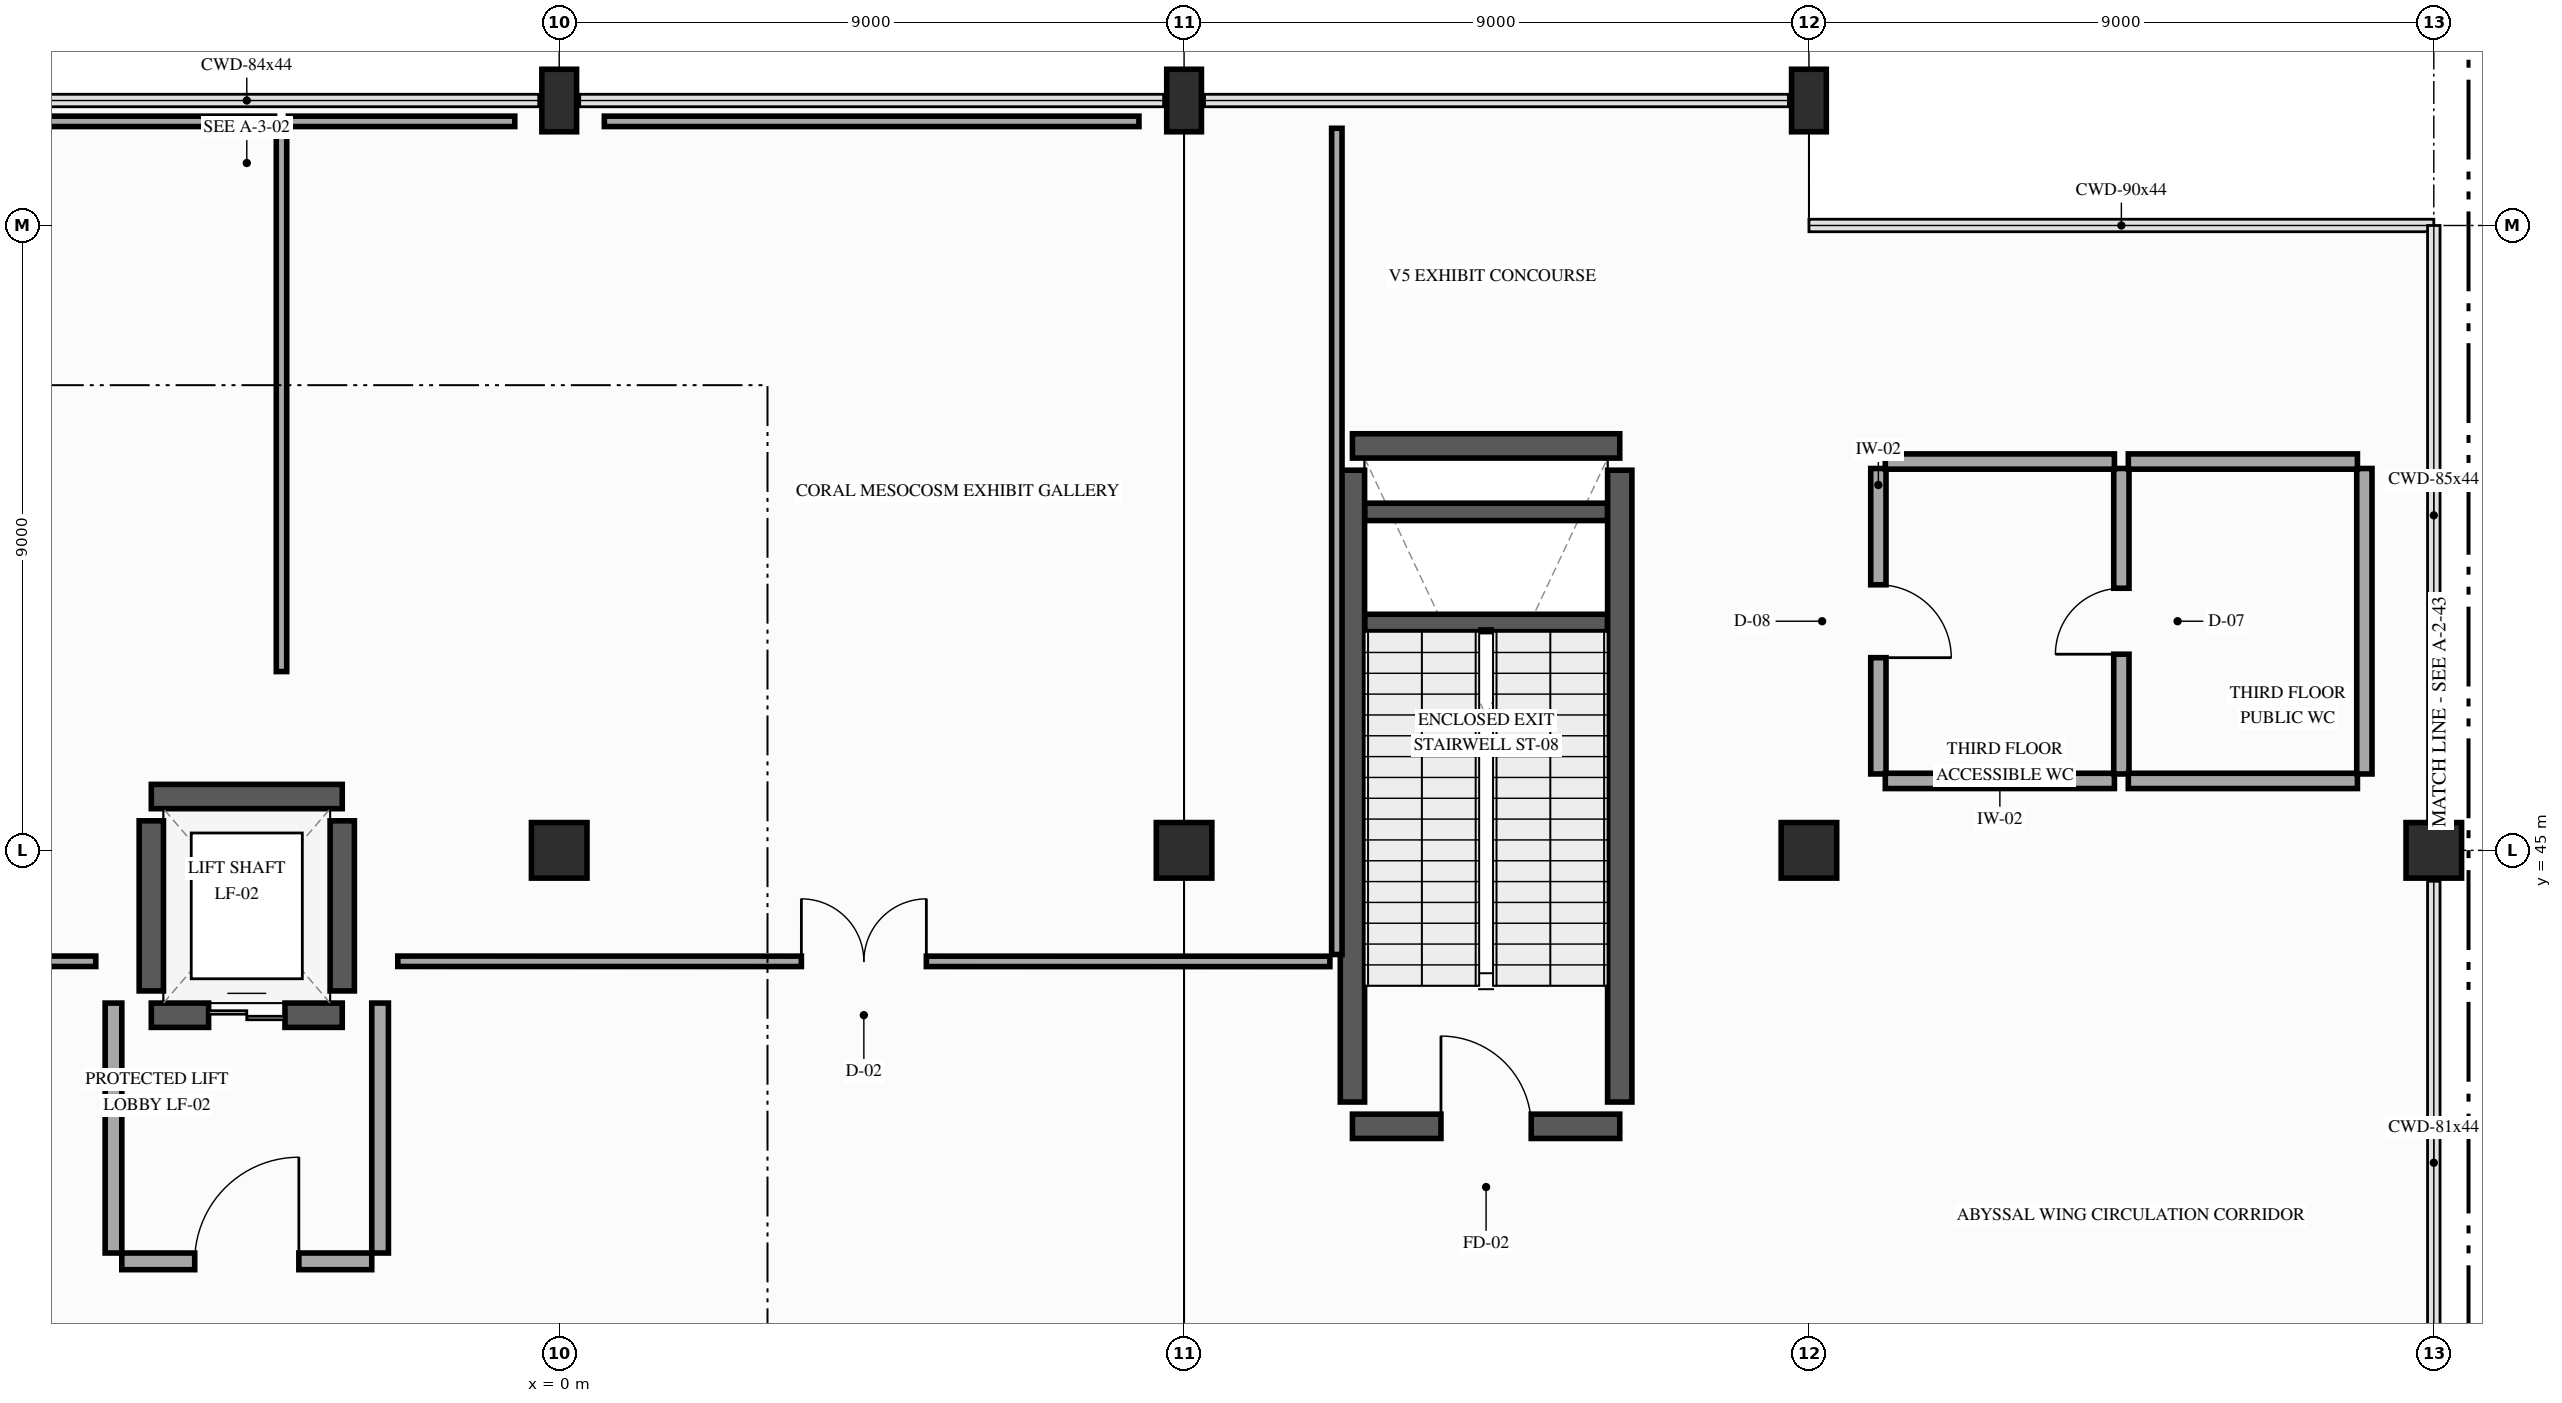
"""IFC4 building model, lengths in metres.
Left out: names, types, materials, properties, quantities, classifications, styles, units other than length and angle.
Written with IfcOpenShell. Run it as: python <this file> out.ifc"""

import sys

from ifc_helpers import new_model, si_unit, direction, frame, frame_2d, origin, origin_2d, place, context, subcontext, project, spatial, rectangle, extrude, element, fill, save


model = new_model("IFC4")
c1 = context("Model", 3, precision=1e-05, world=origin(), true_north=direction((0.0, 1.0)))
c2 = subcontext(c1, "Body", "Model", "MODEL_VIEW")
j1 = project(units=[si_unit("LENGTHUNIT", "METRE"), si_unit("PLANEANGLEUNIT", "RADIAN")], contexts=[c1])
p1 = place(None, origin())
s1 = spatial("IfcSite", under=j1, at=p1, CompositionType="ELEMENT")
p2 = place(p1, origin())
s2 = spatial("IfcBuilding", under=s1, at=p2, CompositionType="ELEMENT")
p3 = place(p2, frame((0.0, 0.0, 16.2)))
s3 = spatial("IfcBuildingStorey", under=s2, at=p3, CompositionType="ELEMENT", Elevation=16.2)
p4 = place(p3, frame((0.0, 45.0, 0.0), z_axis=(0.0, 0.0, 1.0), x_axis=(1.0, 0.0, 0.0)))
e1 = element("IfcColumn", 1, at=p4, inside=s3, PredefinedType="COLUMN", context=c2, shape_type="SweptSolid", body=[
    extrude(rectangle(XDim=0.8, YDim=0.8, at=origin_2d()), origin(), (0.0, 0.0, 1.0), 5.4),
])
p5 = place(p3, frame((0.0, 55.8, 0.0), z_axis=(0.0, 0.0, 1.0), x_axis=(1.0, 0.0, 0.0)))
e2 = element("IfcColumn", 2, at=p5, inside=s3, PredefinedType="PILASTER", context=c2, shape_type="SweptSolid", body=[
    extrude(rectangle(XDim=0.5, YDim=0.9, at=origin_2d()), origin(), (0.0, 0.0, 1.0), 5.4),
])
p6 = place(p3, frame((9.0, 45.0, 0.0), z_axis=(0.0, 0.0, 1.0), x_axis=(1.0, 0.0, 0.0)))
e3 = element("IfcColumn", 3, at=p6, inside=s3, PredefinedType="COLUMN", context=c2, shape_type="SweptSolid", body=[
    extrude(rectangle(XDim=0.8, YDim=0.8, at=origin_2d()), origin(), (0.0, 0.0, 1.0), 5.4),
])
p7 = place(p3, frame((9.0, 55.8, 0.0), z_axis=(0.0, 0.0, 1.0), x_axis=(1.0, 0.0, 0.0)))
e4 = element("IfcColumn", 4, at=p7, inside=s3, PredefinedType="PILASTER", context=c2, shape_type="SweptSolid", body=[
    extrude(rectangle(XDim=0.5, YDim=0.9, at=origin_2d()), origin(), (0.0, 0.0, 1.0), 5.4),
])
p8 = place(p3, frame((18.0, 45.0, 0.0), z_axis=(0.0, 0.0, 1.0), x_axis=(1.0, 0.0, 0.0)))
e5 = element("IfcColumn", 5, at=p8, inside=s3, PredefinedType="COLUMN", context=c2, shape_type="SweptSolid", body=[
    extrude(rectangle(XDim=0.8, YDim=0.8, at=origin_2d()), origin(), (0.0, 0.0, 1.0), 5.4),
])
p9 = place(p3, frame((18.0, 55.8, 0.0), z_axis=(0.0, 0.0, 1.0), x_axis=(1.0, 0.0, 0.0)))
e6 = element("IfcColumn", 6, at=p9, inside=s3, PredefinedType="PILASTER", context=c2, shape_type="SweptSolid", body=[
    extrude(rectangle(XDim=0.5, YDim=0.9, at=origin_2d()), origin(), (0.0, 0.0, 1.0), 5.4),
])
p10 = place(p3, frame((27.0, 45.0, 0.0), z_axis=(0.0, 0.0, 1.0), x_axis=(1.0, 0.0, 0.0)))
e7 = element("IfcColumn", 7, at=p10, inside=s3, PredefinedType="COLUMN", context=c2, shape_type="SweptSolid", body=[
    extrude(rectangle(XDim=0.8, YDim=0.8, at=origin_2d()), origin(), (0.0, 0.0, 1.0), 5.4),
])
for number, where, z_axis, x_axis in (
    (8, (11.6, 48.275, 0.0), (0.0, 0.0, 1.0), (1.0, 0.0, 0.0)),
    (9, (11.6, 49.875, 0.0), (0.0, 0.0, 1.0), (1.0, 0.0, 0.0)),
):
    element("IfcWall", number, at=place(p3, frame(where, z_axis=z_axis, x_axis=x_axis)), inside=s3, PredefinedType="SHEAR", context=c2, shape_type="SweptSolid", body=[
        extrude(rectangle(XDim=3.5, YDim=0.25, at=frame_2d((1.75, 0.0))), origin(), (0.0, 0.0, 1.0), 2.5),
    ])
p11 = place(p3, frame((11.425, 41.025, 0.0), z_axis=(0.0, 0.0, 1.0), x_axis=(1.0, 0.0, 0.0)))
e10 = element("IfcWall", 10, at=p11, inside=s3, PredefinedType="SHEAR", context=c2, shape_type="SweptSolid", body=[
    extrude(rectangle(XDim=3.85, YDim=0.35, at=frame_2d((1.925, 0.0))), origin(), (0.0, 0.0, 1.0), 5.15),
])
p12 = place(p11, frame((1.275, 0.0, 0.0)))
e11 = element("IfcOpeningElement", 11, at=p12, cuts=e10, PredefinedType="OPENING", context=c2, shape_type="SweptSolid", body=[
    extrude(rectangle(XDim=1.3, YDim=2.2, at=frame_2d((0.65, 1.1))), frame((0.0, 0.185, 0.0), z_axis=(0.0, -1.0, 0.0), x_axis=(1.0, 0.0, 0.0)), (0.0, 0.0, 1.0), 0.37),
])
p13 = place(p3, frame((11.425, 50.825, 0.0), z_axis=(0.0, 0.0, 1.0), x_axis=(1.0, 0.0, 0.0)))
e12 = element("IfcWall", 12, at=p13, inside=s3, PredefinedType="SHEAR", context=c2, shape_type="SweptSolid", body=[
    extrude(rectangle(XDim=3.85, YDim=0.35, at=frame_2d((1.925, 0.0))), origin(), (0.0, 0.0, 1.0), 5.15),
])
for number, where, z_axis, x_axis in (
    (13, (11.425, 41.375, 0.0), (0.0, 0.0, 1.0), (0.0, 1.0, 0.0)),
    (14, (15.275, 41.375, 0.0), (0.0, 0.0, 1.0), (0.0, 1.0, 0.0)),
):
    element("IfcWall", number, at=place(p3, frame(where, z_axis=z_axis, x_axis=x_axis)), inside=s3, PredefinedType="SHEAR", context=c2, shape_type="SweptSolid", body=[
        extrude(rectangle(XDim=9.1, YDim=0.35, at=frame_2d((4.55, 0.0))), origin(), (0.0, 0.0, 1.0), 5.15),
    ])
p14 = place(p3, frame((-5.875, 42.625, 0.0), z_axis=(0.0, 0.0, 1.0), x_axis=(1.0, 0.0, 0.0)))
e15 = element("IfcWall", 15, at=p14, inside=s3, PredefinedType="SHEAR", context=c2, shape_type="SweptSolid", body=[
    extrude(rectangle(XDim=2.75, YDim=0.35, at=frame_2d((1.375, 0.0))), origin(), (0.0, 0.0, 1.0), 5.15),
])
p15 = place(p14, frame((0.825, 0.0, 0.0)))
e16 = element("IfcOpeningElement", 16, at=p15, cuts=e15, PredefinedType="OPENING", context=c2, shape_type="SweptSolid", body=[
    extrude(rectangle(XDim=1.1, YDim=2.2, at=frame_2d((0.55, 1.1))), frame((0.0, 0.185, 0.0), z_axis=(0.0, -1.0, 0.0), x_axis=(1.0, 0.0, 0.0)), (0.0, 0.0, 1.0), 0.37),
])
p16 = place(p3, frame((-3.125, 45.775, 0.0), z_axis=(0.0, 0.0, 1.0), x_axis=(-1.0, 0.0, 0.0)))
e17 = element("IfcWall", 17, at=p16, inside=s3, PredefinedType="SHEAR", context=c2, shape_type="SweptSolid", body=[
    extrude(rectangle(XDim=2.75, YDim=0.35, at=frame_2d((1.375, 0.0))), origin(), (0.0, 0.0, 1.0), 5.15),
])
for number, where, z_axis, x_axis in (
    (18, (-5.875, 42.975, 0.0), (0.0, 0.0, 1.0), (0.0, 1.0, 0.0)),
    (19, (-3.125, 42.975, 0.0), (0.0, 0.0, 1.0), (0.0, 1.0, 0.0)),
):
    element("IfcWall", number, at=place(p3, frame(where, z_axis=z_axis, x_axis=x_axis)), inside=s3, PredefinedType="SHEAR", context=c2, shape_type="SweptSolid", body=[
        extrude(rectangle(XDim=2.45, YDim=0.35, at=frame_2d((1.225, 0.0))), origin(), (0.0, 0.0, 1.0), 5.15),
    ])
p17 = place(p3, frame((-6.3, 39.08, 0.0), z_axis=(0.0, 0.0, 1.0), x_axis=(1.0, 0.0, 0.0)))
e20 = element("IfcWall", 20, at=p17, inside=s3, PredefinedType="PARTITIONING", context=c2, shape_type="SweptSolid", body=[
    extrude(rectangle(XDim=3.6, YDim=0.24, at=frame_2d((1.8, 0.0))), origin(), (0.0, 0.0, 1.0), 4.635),
])
p18 = place(p17, frame((1.05, 0.0, 0.0)))
e21 = element("IfcOpeningElement", 21, at=p18, cuts=e20, PredefinedType="OPENING", context=c2, shape_type="SweptSolid", body=[
    extrude(rectangle(XDim=1.5, YDim=2.2, at=frame_2d((0.75, 1.1))), frame((0.0, 0.13, 0.0), z_axis=(0.0, -1.0, 0.0), x_axis=(1.0, 0.0, 0.0)), (0.0, 0.0, 1.0), 0.26),
])
for number, where, z_axis, x_axis in (
    (22, (-6.42, 39.2, 0.0), (0.0, 0.0, 1.0), (0.0, 1.0, 0.0)),
    (23, (-2.58, 39.2, 0.0), (0.0, 0.0, 1.0), (0.0, 1.0, 0.0)),
):
    element("IfcWall", number, at=place(p3, frame(where, z_axis=z_axis, x_axis=x_axis)), inside=s3, PredefinedType="PARTITIONING", context=c2, shape_type="SweptSolid", body=[
        extrude(rectangle(XDim=3.6, YDim=0.24, at=frame_2d((1.8, 0.0))), origin(), (0.0, 0.0, 1.0), 4.635),
    ])
p19 = place(p3, frame((19.0, 50.5, 0.0), z_axis=(0.0, 0.0, 1.0), x_axis=(0.0, -1.0, 0.0)))
e24 = element("IfcWall", 24, at=p19, inside=s3, PredefinedType="PLUMBINGWALL", context=c2, shape_type="SweptSolid", body=[
    extrude(rectangle(XDim=4.4, YDim=0.22, at=frame_2d((2.2, 0.0))), origin(), (0.0, 0.0, 1.0), 5.05),
])
p20 = place(p19, frame((1.675, 0.0, 0.0)))
e25 = element("IfcOpeningElement", 25, at=p20, cuts=e24, PredefinedType="OPENING", context=c2, shape_type="SweptSolid", body=[
    extrude(rectangle(XDim=1.05, YDim=2.15, at=frame_2d((0.525, 1.075))), frame((0.0, 0.12, 0.0), z_axis=(0.0, -1.0, 0.0), x_axis=(1.0, 0.0, 0.0)), (0.0, 0.0, 1.0), 0.24),
])
p21 = place(p3, frame((19.1, 46.0, 0.0), z_axis=(0.0, 0.0, 1.0), x_axis=(1.0, 0.0, 0.0)))
e26 = element("IfcWall", 26, at=p21, inside=s3, PredefinedType="PLUMBINGWALL", context=c2, shape_type="SweptSolid", body=[
    extrude(rectangle(XDim=3.3, YDim=0.22, at=frame_2d((1.65, 0.0))), origin(), (0.0, 0.0, 1.0), 5.05),
])
p22 = place(p3, frame((22.5, 46.1, 0.0), z_axis=(0.0, 0.0, 1.0), x_axis=(0.0, 1.0, 0.0)))
e27 = element("IfcWall", 27, at=p22, inside=s3, PredefinedType="PLUMBINGWALL", context=c2, shape_type="SweptSolid", body=[
    extrude(rectangle(XDim=4.4, YDim=0.22, at=frame_2d((2.2, 0.0))), origin(), (0.0, 0.0, 1.0), 5.05),
])
p23 = place(p22, frame((1.725, 0.0, 0.0)))
e28 = element("IfcOpeningElement", 28, at=p23, cuts=e27, PredefinedType="OPENING", context=c2, shape_type="SweptSolid", body=[
    extrude(rectangle(XDim=0.95, YDim=2.15, at=frame_2d((0.475, 1.075))), frame((0.0, 0.12, 0.0), z_axis=(0.0, -1.0, 0.0), x_axis=(1.0, 0.0, 0.0)), (0.0, 0.0, 1.0), 0.24),
])
for number, where, z_axis, x_axis in (
    (29, (22.4, 50.6, 0.0), (0.0, 0.0, 1.0), (-1.0, 0.0, 0.0)),
    (30, (22.6, 46.0, 0.0), (0.0, 0.0, 1.0), (1.0, 0.0, 0.0)),
):
    element("IfcWall", number, at=place(p3, frame(where, z_axis=z_axis, x_axis=x_axis)), inside=s3, PredefinedType="PLUMBINGWALL", context=c2, shape_type="SweptSolid", body=[
        extrude(rectangle(XDim=3.3, YDim=0.22, at=frame_2d((1.65, 0.0))), origin(), (0.0, 0.0, 1.0), 5.05),
    ])
p24 = place(p3, frame((26.0, 46.1, 0.0), z_axis=(0.0, 0.0, 1.0), x_axis=(0.0, 1.0, 0.0)))
e31 = element("IfcWall", 31, at=p24, inside=s3, PredefinedType="PLUMBINGWALL", context=c2, shape_type="SweptSolid", body=[
    extrude(rectangle(XDim=4.4, YDim=0.22, at=frame_2d((2.2, 0.0))), origin(), (0.0, 0.0, 1.0), 5.05),
])
p25 = place(p3, frame((25.9, 50.6, 0.0), z_axis=(0.0, 0.0, 1.0), x_axis=(-1.0, 0.0, 0.0)))
e32 = element("IfcWall", 32, at=p25, inside=s3, PredefinedType="PLUMBINGWALL", context=c2, shape_type="SweptSolid", body=[
    extrude(rectangle(XDim=3.3, YDim=0.22, at=frame_2d((1.65, 0.0))), origin(), (0.0, 0.0, 1.0), 5.05),
])
p26 = place(p3, frame((-20.1, 43.4, 0.0), z_axis=(0.0, 0.0, 1.0), x_axis=(0.999999986606, 0.000163669095, 0.0)))
e33 = element("IfcWall", 33, at=p26, inside=s3, PredefinedType="PARTITIONING", context=c2, shape_type="SweptSolid", body=[
    extrude(rectangle(XDim=13.425, YDim=0.15, at=frame_2d((6.712, 0.0))), origin(), (0.0, 0.0, 1.0), 4.435),
])
p27 = place(p26, frame((5.813, 0.0, 0.0)))
e34 = element("IfcOpeningElement", 34, at=p27, cuts=e33, PredefinedType="OPENING", context=c2, shape_type="SweptSolid", body=[
    extrude(rectangle(XDim=1.8, YDim=2.3, at=frame_2d((0.9, 1.15))), frame((0.0, 0.085, 0.0), z_axis=(0.0, -1.0, 0.0), x_axis=(1.0, 0.0, 0.0)), (0.0, 0.0, 1.0), 0.17),
])
p28 = place(p3, frame((-4.0, 47.575, 0.0), z_axis=(0.0, 0.0, 1.0), x_axis=(0.0, 1.0, 0.0)))
e35 = element("IfcWall", 35, at=p28, inside=s3, PredefinedType="PARTITIONING", context=c2, shape_type="SweptSolid", body=[
    extrude(rectangle(XDim=7.825, YDim=0.15, at=frame_2d((3.913, 0.0))), origin(), (0.0, 0.0, 1.0), 4.385),
])
p29 = place(p3, frame((-4.1, 55.5, 0.0), z_axis=(0.0, 0.0, 1.0), x_axis=(-1.0, 0.0, 0.0)))
e36 = element("IfcWall", 36, at=p29, inside=s3, PredefinedType="PARTITIONING", context=c2, shape_type="SweptSolid", body=[
    extrude(rectangle(XDim=4.25, YDim=0.15, at=frame_2d((2.125, 0.0))), origin(), (0.0, 0.0, 1.0), 4.385),
])
p30 = place(p3, frame((-2.325, 43.402, 0.0), z_axis=(0.0, 0.0, 1.0), x_axis=(0.999999986606, -0.000163669095, 0.0)))
e37 = element("IfcWall", 37, at=p30, inside=s3, PredefinedType="PARTITIONING", context=c2, shape_type="SweptSolid", body=[
    extrude(rectangle(XDim=13.425, YDim=0.15, at=frame_2d((6.712, 0.0))), origin(), (0.0, 0.0, 1.0), 4.435),
])
p31 = place(p30, frame((5.813, 0.0, 0.0)))
e38 = element("IfcOpeningElement", 38, at=p31, cuts=e37, PredefinedType="OPENING", context=c2, shape_type="SweptSolid", body=[
    extrude(rectangle(XDim=1.8, YDim=2.3, at=frame_2d((0.9, 1.15))), frame((0.0, 0.085, 0.0), z_axis=(0.0, -1.0, 0.0), x_axis=(1.0, 0.0, 0.0)), (0.0, 0.0, 1.0), 0.17),
])
p32 = place(p3, frame((11.2, 43.5, 0.0), z_axis=(0.0, 0.0, 1.0), x_axis=(0.0, 1.0, 0.0)))
e39 = element("IfcWall", 39, at=p32, inside=s3, PredefinedType="PARTITIONING", context=c2, shape_type="SweptSolid", body=[
    extrude(rectangle(XDim=11.9, YDim=0.15, at=frame_2d((5.95, 0.0))), origin(), (0.0, 0.0, 1.0), 4.385),
])
p33 = place(p3, frame((8.35, 55.5, 0.0), z_axis=(0.0, 0.0, 1.0), x_axis=(-1.0, 0.0, 0.0)))
e40 = element("IfcWall", 40, at=p33, inside=s3, PredefinedType="PARTITIONING", context=c2, shape_type="SweptSolid", body=[
    extrude(rectangle(XDim=7.7, YDim=0.15, at=frame_2d((3.85, 0.0))), origin(), (0.0, 0.0, 1.0), 4.385),
])
p34 = place(p3, frame((-0.64, 55.5, 0.0), z_axis=(0.0, 0.0, 1.0), x_axis=(-1.0, 0.0, 0.0)))
e41 = element("IfcWall", 41, at=p34, inside=s3, PredefinedType="PARTITIONING", context=c2, shape_type="SweptSolid", body=[
    extrude(rectangle(XDim=3.26, YDim=0.15, at=frame_2d((1.63, 0.0))), origin(), (0.0, 0.0, 1.0), 4.385),
])
p35 = place(p12, origin())
e42 = element("IfcDoor", 42, at=p35, inside=s3, OperationType="SINGLE_SWING_LEFT", PredefinedType="DOOR", context=c2, shape_type="SweptSolid", body=[
    extrude(rectangle(XDim=1.3, YDim=2.2, at=frame_2d((0.65, 1.1))), frame((0.0, 0.025, 0.0), z_axis=(0.0, -1.0, 0.0), x_axis=(1.0, 0.0, 0.0)), (0.0, 0.0, 1.0), 0.05),
])
fill(e11, e42)
p36 = place(p15, origin())
e43 = element("IfcDoor", 43, at=p36, inside=s3, OperationType="DOUBLE_DOOR_SLIDING", PredefinedType="DOOR", context=c2, shape_type="SweptSolid", body=[
    extrude(rectangle(XDim=1.1, YDim=2.2, at=frame_2d((0.55, 1.1))), frame((0.0, 0.025, 0.0), z_axis=(0.0, -1.0, 0.0), x_axis=(1.0, 0.0, 0.0)), (0.0, 0.0, 1.0), 0.05),
])
fill(e16, e43)
p37 = place(p18, origin())
e44 = element("IfcDoor", 44, at=p37, inside=s3, OperationType="SINGLE_SWING_RIGHT", PredefinedType="DOOR", context=c2, shape_type="SweptSolid", body=[
    extrude(rectangle(XDim=1.5, YDim=2.2, at=frame_2d((0.75, 1.1))), frame((0.0, 0.025, 0.0), z_axis=(0.0, -1.0, 0.0), x_axis=(1.0, 0.0, 0.0)), (0.0, 0.0, 1.0), 0.05),
])
fill(e21, e44)
p38 = place(p20, origin())
e45 = element("IfcDoor", 45, at=p38, inside=s3, OperationType="SINGLE_SWING_RIGHT", PredefinedType="DOOR", context=c2, shape_type="SweptSolid", body=[
    extrude(rectangle(XDim=1.05, YDim=2.15, at=frame_2d((0.525, 1.075))), frame((0.0, 0.025, 0.0), z_axis=(0.0, -1.0, 0.0), x_axis=(1.0, 0.0, 0.0)), (0.0, 0.0, 1.0), 0.05),
])
fill(e25, e45)
p39 = place(p23, origin())
e46 = element("IfcDoor", 46, at=p39, inside=s3, OperationType="SINGLE_SWING_LEFT", PredefinedType="DOOR", context=c2, shape_type="SweptSolid", body=[
    extrude(rectangle(XDim=0.95, YDim=2.15, at=frame_2d((0.475, 1.075))), frame((0.0, 0.025, 0.0), z_axis=(0.0, -1.0, 0.0), x_axis=(1.0, 0.0, 0.0)), (0.0, 0.0, 1.0), 0.05),
])
fill(e28, e46)
p40 = place(p31, origin())
e47 = element("IfcDoor", 47, at=p40, inside=s3, OperationType="DOUBLE_DOOR_SINGLE_SWING", PredefinedType="DOOR", context=c2, shape_type="SweptSolid", body=[
    extrude(rectangle(XDim=1.8, YDim=2.3, at=frame_2d((0.9, 1.15))), frame((0.0, 0.025, 0.0), z_axis=(0.0, -1.0, 0.0), x_axis=(1.0, 0.0, 0.0)), (0.0, 0.0, 1.0), 0.05),
])
fill(e38, e47)
save(model, sys.argv[1])
